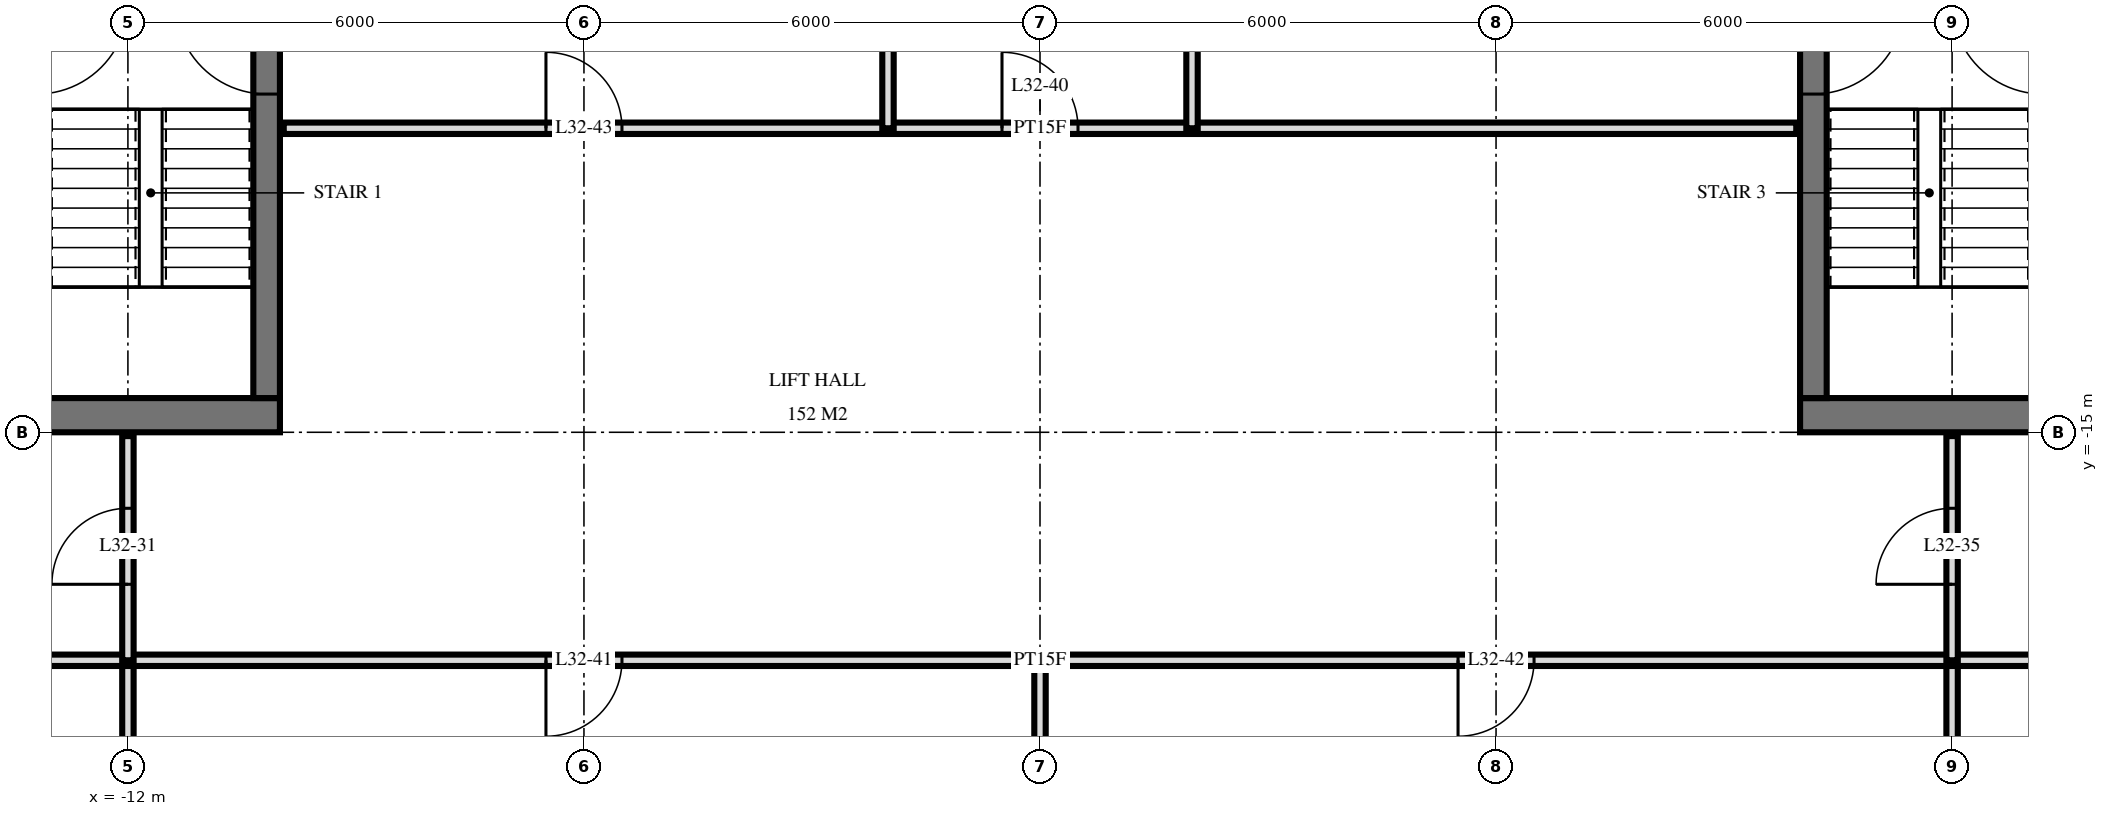
"""IFC4 building model, lengths in metres.
Left out: names, types, materials, properties, quantities, classifications, styles, units other than length and angle.
Written with IfcOpenShell. Run it as: python <this file> out.ifc"""

import sys

from ifc_helpers import new_model, si_unit, direction, frame, frame_2d, origin, place, context, subcontext, project, spatial, rectangle, extrude, element, fill, save


model = new_model("IFC4")
c1 = context("Model", 3, precision=1e-05, world=origin(), true_north=direction((0.0, 1.0)))
c2 = subcontext(c1, "Body", "Model", "MODEL_VIEW")
j1 = project(units=[si_unit("LENGTHUNIT", "METRE"), si_unit("PLANEANGLEUNIT", "RADIAN")], contexts=[c1])
p1 = place(None, origin())
s1 = spatial("IfcSite", under=j1, at=p1, CompositionType="ELEMENT")
p2 = place(p1, origin())
s2 = spatial("IfcBuilding", under=s1, at=p2, CompositionType="ELEMENT")
p3 = place(p2, frame((0.0, 0.0, 127.2)))
s3 = spatial("IfcBuildingStorey", under=s2, at=p3, CompositionType="ELEMENT", Elevation=127.2)
p4 = place(p3, frame((-24.5, -14.775, 0.0), z_axis=(0.0, 0.0, 1.0), x_axis=(1.0, 0.0, 0.0)))
e1 = element("IfcWall", 1, at=p4, inside=s3, PredefinedType="SHEAR", context=c2, shape_type="SweptSolid", body=[
    extrude(rectangle(XDim=14.5, YDim=0.45, at=frame_2d((7.25, 0.0))), origin(), (0.0, 0.0, 1.0), 3.6),
])
p5 = place(p4, frame((6.2, 0.0, 0.0)))
e2 = element("IfcOpeningElement", 2, at=p5, cuts=e1, PredefinedType="OPENING", context=c2, shape_type="SweptSolid", body=[
    extrude(rectangle(XDim=1.2, YDim=2.1, at=frame_2d((0.6, 1.05))), frame((0.0, 0.235, 0.0), z_axis=(0.0, -1.0, 0.0), x_axis=(1.0, 0.0, 0.0)), (0.0, 0.0, 1.0), 0.47),
])
p6 = place(p4, frame((9.25, 0.0, 0.0)))
e3 = element("IfcOpeningElement", 3, at=p6, cuts=e1, PredefinedType="OPENING", context=c2, shape_type="SweptSolid", body=[
    extrude(rectangle(XDim=1.1, YDim=2.1, at=frame_2d((0.55, 1.05))), frame((0.0, 0.235, 0.0), z_axis=(0.0, -1.0, 0.0), x_axis=(1.0, 0.0, 0.0)), (0.0, 0.0, 1.0), 0.47),
])
p7 = place(p4, frame((3.5, 0.0, 0.0)))
e4 = element("IfcOpeningElement", 4, at=p7, cuts=e1, PredefinedType="OPENING", context=c2, shape_type="SweptSolid", body=[
    extrude(rectangle(XDim=0.9, YDim=2.1, at=frame_2d((0.45, 1.05))), frame((0.0, 0.235, 0.0), z_axis=(0.0, -1.0, 0.0), x_axis=(1.0, 0.0, 0.0)), (0.0, 0.0, 1.0), 0.47),
])
p8 = place(p4, frame((1.05, 0.0, 0.0)))
e5 = element("IfcOpeningElement", 5, at=p8, cuts=e1, PredefinedType="OPENING", context=c2, shape_type="SweptSolid", body=[
    extrude(rectangle(XDim=1.0, YDim=2.1, at=frame_2d((0.5, 1.05))), frame((0.0, 0.235, 0.0), z_axis=(0.0, -1.0, 0.0), x_axis=(1.0, 0.0, 0.0)), (0.0, 0.0, 1.0), 0.47),
])
p9 = place(p3, frame((-10.175, -14.55, 0.0), z_axis=(0.0, 0.0, 1.0), x_axis=(0.0, 1.0, 0.0)))
e6 = element("IfcWall", 6, at=p9, inside=s3, PredefinedType="SHEAR", context=c2, shape_type="SweptSolid", body=[
    extrude(rectangle(XDim=14.1, YDim=0.35, at=frame_2d((7.05, 0.0))), origin(), (0.0, 0.0, 1.0), 3.6),
])
p10 = place(p9, frame((8.4, 0.0, 0.0)))
e7 = element("IfcOpeningElement", 7, at=p10, cuts=e6, PredefinedType="OPENING", context=c2, shape_type="SweptSolid", body=[
    extrude(rectangle(XDim=1.4, YDim=2.4, at=frame_2d((0.7, 1.2))), frame((0.0, 0.185, 0.0), z_axis=(0.0, -1.0, 0.0), x_axis=(1.0, 0.0, 0.0)), (0.0, 0.0, 1.0), 0.37),
])
p11 = place(p9, frame((10.0, 0.0, 0.0)))
e8 = element("IfcOpeningElement", 8, at=p11, cuts=e6, PredefinedType="OPENING", context=c2, shape_type="SweptSolid", body=[
    extrude(rectangle(XDim=1.4, YDim=2.4, at=frame_2d((0.7, 1.2))), frame((0.0, 0.185, 0.0), z_axis=(0.0, -1.0, 0.0), x_axis=(1.0, 0.0, 0.0)), (0.0, 0.0, 1.0), 0.37),
])
p12 = place(p9, frame((4.0, 0.0, 0.0)))
e9 = element("IfcOpeningElement", 9, at=p12, cuts=e6, PredefinedType="OPENING", context=c2, shape_type="SweptSolid", body=[
    extrude(rectangle(XDim=1.2, YDim=2.1, at=frame_2d((0.6, 1.05))), frame((0.0, 0.185, 0.0), z_axis=(0.0, -1.0, 0.0), x_axis=(1.0, 0.0, 0.0)), (0.0, 0.0, 1.0), 0.37),
])
p13 = place(p3, frame((10.0, -14.775, 0.0), z_axis=(0.0, 0.0, 1.0), x_axis=(1.0, 0.0, 0.0)))
e10 = element("IfcWall", 10, at=p13, inside=s3, PredefinedType="SHEAR", context=c2, shape_type="SweptSolid", body=[
    extrude(rectangle(XDim=14.5, YDim=0.45, at=frame_2d((7.25, 0.0))), origin(), (0.0, 0.0, 1.0), 3.6),
])
p14 = place(p13, frame((7.1, 0.0, 0.0)))
e11 = element("IfcOpeningElement", 11, at=p14, cuts=e10, PredefinedType="OPENING", context=c2, shape_type="SweptSolid", body=[
    extrude(rectangle(XDim=1.2, YDim=2.1, at=frame_2d((0.6, 1.05))), frame((0.0, 0.235, 0.0), z_axis=(0.0, -1.0, 0.0), x_axis=(1.0, 0.0, 0.0)), (0.0, 0.0, 1.0), 0.47),
])
p15 = place(p13, frame((4.15, 0.0, 0.0)))
e12 = element("IfcOpeningElement", 12, at=p15, cuts=e10, PredefinedType="OPENING", context=c2, shape_type="SweptSolid", body=[
    extrude(rectangle(XDim=1.1, YDim=2.1, at=frame_2d((0.55, 1.05))), frame((0.0, 0.235, 0.0), z_axis=(0.0, -1.0, 0.0), x_axis=(1.0, 0.0, 0.0)), (0.0, 0.0, 1.0), 0.47),
])
p16 = place(p13, frame((10.1, 0.0, 0.0)))
e13 = element("IfcOpeningElement", 13, at=p16, cuts=e10, PredefinedType="OPENING", context=c2, shape_type="SweptSolid", body=[
    extrude(rectangle(XDim=0.9, YDim=2.1, at=frame_2d((0.45, 1.05))), frame((0.0, 0.235, 0.0), z_axis=(0.0, -1.0, 0.0), x_axis=(1.0, 0.0, 0.0)), (0.0, 0.0, 1.0), 0.47),
])
p17 = place(p13, frame((12.45, 0.0, 0.0)))
e14 = element("IfcOpeningElement", 14, at=p17, cuts=e10, PredefinedType="OPENING", context=c2, shape_type="SweptSolid", body=[
    extrude(rectangle(XDim=1.0, YDim=2.1, at=frame_2d((0.5, 1.05))), frame((0.0, 0.235, 0.0), z_axis=(0.0, -1.0, 0.0), x_axis=(1.0, 0.0, 0.0)), (0.0, 0.0, 1.0), 0.47),
])
p18 = place(p3, frame((10.175, -14.55, 0.0), z_axis=(0.0, 0.0, 1.0), x_axis=(0.0, 1.0, 0.0)))
e15 = element("IfcWall", 15, at=p18, inside=s3, PredefinedType="SHEAR", context=c2, shape_type="SweptSolid", body=[
    extrude(rectangle(XDim=14.1, YDim=0.35, at=frame_2d((7.05, 0.0))), origin(), (0.0, 0.0, 1.0), 3.6),
])
p19 = place(p18, frame((8.4, 0.0, 0.0)))
e16 = element("IfcOpeningElement", 16, at=p19, cuts=e15, PredefinedType="OPENING", context=c2, shape_type="SweptSolid", body=[
    extrude(rectangle(XDim=1.4, YDim=2.4, at=frame_2d((0.7, 1.2))), frame((0.0, 0.185, 0.0), z_axis=(0.0, -1.0, 0.0), x_axis=(1.0, 0.0, 0.0)), (0.0, 0.0, 1.0), 0.37),
])
p20 = place(p18, frame((10.0, 0.0, 0.0)))
e17 = element("IfcOpeningElement", 17, at=p20, cuts=e15, PredefinedType="OPENING", context=c2, shape_type="SweptSolid", body=[
    extrude(rectangle(XDim=1.4, YDim=2.4, at=frame_2d((0.7, 1.2))), frame((0.0, 0.185, 0.0), z_axis=(0.0, -1.0, 0.0), x_axis=(1.0, 0.0, 0.0)), (0.0, 0.0, 1.0), 0.37),
])
p21 = place(p18, frame((4.0, 0.0, 0.0)))
e18 = element("IfcOpeningElement", 18, at=p21, cuts=e15, PredefinedType="OPENING", context=c2, shape_type="SweptSolid", body=[
    extrude(rectangle(XDim=1.2, YDim=2.1, at=frame_2d((0.6, 1.05))), frame((0.0, 0.185, 0.0), z_axis=(0.0, -1.0, 0.0), x_axis=(1.0, 0.0, 0.0)), (0.0, 0.0, 1.0), 0.37),
])
p22 = place(p3, frame((12.0, -18.0, 0.0), z_axis=(0.0, 0.0, 1.0), x_axis=(0.0, 1.0, 0.0)))
e19 = element("IfcWall", 19, at=p22, inside=s3, PredefinedType="PARTITIONING", context=c2, shape_type="SweptSolid", body=[
    extrude(rectangle(XDim=2.95, YDim=0.15, at=frame_2d((1.475, 0.0))), origin(), (0.0, 0.0, 1.0), 3.32),
])
p23 = place(p22, frame((1.0, 0.0, 0.0)))
e20 = element("IfcOpeningElement", 20, at=p23, cuts=e19, PredefinedType="OPENING", context=c2, shape_type="SweptSolid", body=[
    extrude(rectangle(XDim=1.0, YDim=2.1, at=frame_2d((0.5, 1.05))), frame((0.0, 0.085, 0.0), z_axis=(0.0, -1.0, 0.0), x_axis=(1.0, 0.0, 0.0)), (0.0, 0.0, 1.0), 0.17),
])
p24 = place(p3, frame((12.0, -33.62, 0.0), z_axis=(0.0, 0.0, 1.0), x_axis=(0.0, 1.0, 0.0)))
e21 = element("IfcWall", 21, at=p24, inside=s3, PredefinedType="PARTITIONING", context=c2, shape_type="SweptSolid", body=[
    extrude(rectangle(XDim=15.62, YDim=0.15, at=frame_2d((7.81, 0.0))), origin(), (0.0, 0.0, 1.0), 3.32),
])
p25 = place(p3, frame((2.0, -11.0, 0.0), z_axis=(0.0, 0.0, 1.0), x_axis=(0.0, 1.0, 0.0)))
e22 = element("IfcWall", 22, at=p25, inside=s3, PredefinedType="PARTITIONING", context=c2, shape_type="SweptSolid", body=[
    extrude(rectangle(XDim=4.0, YDim=0.15, at=frame_2d((2.0, 0.0))), origin(), (0.0, 0.0, 1.0), 3.32),
])
p26 = place(p3, frame((0.0, -33.62, 0.0), z_axis=(0.0, 0.0, 1.0), x_axis=(0.0, 1.0, 0.0)))
e23 = element("IfcWall", 23, at=p26, inside=s3, PredefinedType="PARTITIONING", context=c2, shape_type="SweptSolid", body=[
    extrude(rectangle(XDim=15.62, YDim=0.15, at=frame_2d((7.81, 0.0))), origin(), (0.0, 0.0, 1.0), 3.32),
])
p27 = place(p3, frame((-2.0, -11.0, 0.0), z_axis=(0.0, 0.0, 1.0), x_axis=(0.0, 1.0, 0.0)))
e24 = element("IfcWall", 24, at=p27, inside=s3, PredefinedType="PARTITIONING", context=c2, shape_type="SweptSolid", body=[
    extrude(rectangle(XDim=4.0, YDim=0.15, at=frame_2d((2.0, 0.0))), origin(), (0.0, 0.0, 1.0), 3.32),
])
p28 = place(p3, frame((-12.0, -18.0, 0.0), z_axis=(0.0, 0.0, 1.0), x_axis=(0.0, 1.0, 0.0)))
e25 = element("IfcWall", 25, at=p28, inside=s3, PredefinedType="PARTITIONING", context=c2, shape_type="SweptSolid", body=[
    extrude(rectangle(XDim=2.95, YDim=0.15, at=frame_2d((1.475, 0.0))), origin(), (0.0, 0.0, 1.0), 3.32),
])
p29 = place(p28, frame((1.0, 0.0, 0.0)))
e26 = element("IfcOpeningElement", 26, at=p29, cuts=e25, PredefinedType="OPENING", context=c2, shape_type="SweptSolid", body=[
    extrude(rectangle(XDim=1.0, YDim=2.1, at=frame_2d((0.5, 1.05))), frame((0.0, 0.085, 0.0), z_axis=(0.0, -1.0, 0.0), x_axis=(1.0, 0.0, 0.0)), (0.0, 0.0, 1.0), 0.17),
])
p30 = place(p3, frame((-12.0, -33.62, 0.0), z_axis=(0.0, 0.0, 1.0), x_axis=(0.0, 1.0, 0.0)))
e27 = element("IfcWall", 27, at=p30, inside=s3, PredefinedType="PARTITIONING", context=c2, shape_type="SweptSolid", body=[
    extrude(rectangle(XDim=15.62, YDim=0.15, at=frame_2d((7.81, 0.0))), origin(), (0.0, 0.0, 1.0), 3.32),
])
p31 = place(p3, frame((-28.02, -18.0, 0.0), z_axis=(0.0, 0.0, 1.0), x_axis=(1.0, 0.0, 0.0)))
e28 = element("IfcWall", 28, at=p31, inside=s3, PredefinedType="PARTITIONING", context=c2, shape_type="SweptSolid", body=[
    extrude(rectangle(XDim=56.04, YDim=0.15, at=frame_2d((28.02, 0.0))), origin(), (0.0, 0.0, 1.0), 3.32),
])
p32 = place(p31, frame((13.17, 0.0, 0.0)))
e29 = element("IfcOpeningElement", 29, at=p32, cuts=e28, PredefinedType="OPENING", context=c2, shape_type="SweptSolid", body=[
    extrude(rectangle(XDim=1.0, YDim=2.1, at=frame_2d((0.5, 1.05))), frame((0.0, 0.085, 0.0), z_axis=(0.0, -1.0, 0.0), x_axis=(1.0, 0.0, 0.0)), (0.0, 0.0, 1.0), 0.17),
])
p33 = place(p31, frame((11.32, 0.0, 0.0)))
e30 = element("IfcOpeningElement", 30, at=p33, cuts=e28, PredefinedType="OPENING", context=c2, shape_type="SweptSolid", body=[
    extrude(rectangle(XDim=1.0, YDim=2.1, at=frame_2d((0.5, 1.05))), frame((0.0, 0.085, 0.0), z_axis=(0.0, -1.0, 0.0), x_axis=(1.0, 0.0, 0.0)), (0.0, 0.0, 1.0), 0.17),
])
p34 = place(p31, frame((41.87, 0.0, 0.0)))
e31 = element("IfcOpeningElement", 31, at=p34, cuts=e28, PredefinedType="OPENING", context=c2, shape_type="SweptSolid", body=[
    extrude(rectangle(XDim=1.0, YDim=2.1, at=frame_2d((0.5, 1.05))), frame((0.0, 0.085, 0.0), z_axis=(0.0, -1.0, 0.0), x_axis=(1.0, 0.0, 0.0)), (0.0, 0.0, 1.0), 0.17),
])
p35 = place(p31, frame((43.17, 0.0, 0.0)))
e32 = element("IfcOpeningElement", 32, at=p35, cuts=e28, PredefinedType="OPENING", context=c2, shape_type="SweptSolid", body=[
    extrude(rectangle(XDim=1.0, YDim=2.1, at=frame_2d((0.5, 1.05))), frame((0.0, 0.085, 0.0), z_axis=(0.0, -1.0, 0.0), x_axis=(1.0, 0.0, 0.0)), (0.0, 0.0, 1.0), 0.17),
])
p36 = place(p31, frame((46.72, 0.0, 0.0)))
e33 = element("IfcOpeningElement", 33, at=p36, cuts=e28, PredefinedType="OPENING", context=c2, shape_type="SweptSolid", body=[
    extrude(rectangle(XDim=1.0, YDim=2.1, at=frame_2d((0.5, 1.05))), frame((0.0, 0.085, 0.0), z_axis=(0.0, -1.0, 0.0), x_axis=(1.0, 0.0, 0.0)), (0.0, 0.0, 1.0), 0.17),
])
p37 = place(p31, frame((21.52, 0.0, 0.0)))
e34 = element("IfcOpeningElement", 34, at=p37, cuts=e28, PredefinedType="OPENING", context=c2, shape_type="SweptSolid", body=[
    extrude(rectangle(XDim=1.0, YDim=2.1, at=frame_2d((0.5, 1.05))), frame((0.0, 0.085, 0.0), z_axis=(0.0, -1.0, 0.0), x_axis=(1.0, 0.0, 0.0)), (0.0, 0.0, 1.0), 0.17),
])
p38 = place(p31, frame((33.52, 0.0, 0.0)))
e35 = element("IfcOpeningElement", 35, at=p38, cuts=e28, PredefinedType="OPENING", context=c2, shape_type="SweptSolid", body=[
    extrude(rectangle(XDim=1.0, YDim=2.1, at=frame_2d((0.5, 1.05))), frame((0.0, 0.085, 0.0), z_axis=(0.0, -1.0, 0.0), x_axis=(1.0, 0.0, 0.0)), (0.0, 0.0, 1.0), 0.17),
])
p39 = place(p3, frame((-9.95, -11.0, 0.0), z_axis=(0.0, 0.0, 1.0), x_axis=(1.0, 0.0, 0.0)))
e36 = element("IfcWall", 36, at=p39, inside=s3, PredefinedType="PARTITIONING", context=c2, shape_type="SweptSolid", body=[
    extrude(rectangle(XDim=19.9, YDim=0.15, at=frame_2d((9.95, 0.0))), origin(), (0.0, 0.0, 1.0), 3.32),
])
p40 = place(p39, frame((9.45, 0.0, 0.0)))
e37 = element("IfcOpeningElement", 37, at=p40, cuts=e36, PredefinedType="OPENING", context=c2, shape_type="SweptSolid", body=[
    extrude(rectangle(XDim=1.0, YDim=2.1, at=frame_2d((0.5, 1.05))), frame((0.0, 0.085, 0.0), z_axis=(0.0, -1.0, 0.0), x_axis=(1.0, 0.0, 0.0)), (0.0, 0.0, 1.0), 0.17),
])
p41 = place(p39, frame((3.45, 0.0, 0.0)))
e38 = element("IfcOpeningElement", 38, at=p41, cuts=e36, PredefinedType="OPENING", context=c2, shape_type="SweptSolid", body=[
    extrude(rectangle(XDim=1.0, YDim=2.1, at=frame_2d((0.5, 1.05))), frame((0.0, 0.085, 0.0), z_axis=(0.0, -1.0, 0.0), x_axis=(1.0, 0.0, 0.0)), (0.0, 0.0, 1.0), 0.17),
])
p42 = place(p12, origin())
e39 = element("IfcDoor", 39, at=p42, inside=s3, OperationType="SINGLE_SWING_LEFT", PredefinedType="DOOR", context=c2, shape_type="SweptSolid", body=[
    extrude(rectangle(XDim=1.2, YDim=2.1, at=frame_2d((0.6, 1.05))), frame((0.0, 0.025, 0.0), z_axis=(0.0, -1.0, 0.0), x_axis=(1.0, 0.0, 0.0)), (0.0, 0.0, 1.0), 0.05),
])
fill(e9, e39)
p43 = place(p21, frame((0.6, 0.0, 0.0), z_axis=(0.0, 0.0, 1.0), x_axis=(-1.0, 0.0, 0.0)))
e40 = element("IfcDoor", 40, at=p43, inside=s3, OperationType="SINGLE_SWING_RIGHT", PredefinedType="DOOR", context=c2, shape_type="SweptSolid", body=[
    extrude(rectangle(XDim=1.2, YDim=2.1, at=frame_2d((0.0, 1.05))), frame((0.0, -0.025, 0.0), z_axis=(0.0, 1.0, 0.0), x_axis=(-1.0, 0.0, 0.0)), (0.0, 0.0, 1.0), 0.05),
])
fill(e18, e40)
p44 = place(p29, origin())
e41 = element("IfcDoor", 41, at=p44, inside=s3, OperationType="SINGLE_SWING_RIGHT", PredefinedType="DOOR", context=c2, shape_type="SweptSolid", body=[
    extrude(rectangle(XDim=1.0, YDim=2.1, at=frame_2d((0.5, 1.05))), frame((0.0, 0.025, 0.0), z_axis=(0.0, -1.0, 0.0), x_axis=(1.0, 0.0, 0.0)), (0.0, 0.0, 1.0), 0.05),
])
fill(e26, e41)
p45 = place(p23, origin())
e42 = element("IfcDoor", 42, at=p45, inside=s3, OperationType="SINGLE_SWING_RIGHT", PredefinedType="DOOR", context=c2, shape_type="SweptSolid", body=[
    extrude(rectangle(XDim=1.0, YDim=2.1, at=frame_2d((0.5, 1.05))), frame((0.0, 0.025, 0.0), z_axis=(0.0, -1.0, 0.0), x_axis=(1.0, 0.0, 0.0)), (0.0, 0.0, 1.0), 0.05),
])
fill(e20, e42)
p46 = place(p40, origin())
e43 = element("IfcDoor", 43, at=p46, inside=s3, OperationType="SINGLE_SWING_RIGHT", PredefinedType="DOOR", context=c2, shape_type="SweptSolid", body=[
    extrude(rectangle(XDim=1.0, YDim=2.1, at=frame_2d((0.5, 1.05))), frame((0.0, 0.025, 0.0), z_axis=(0.0, -1.0, 0.0), x_axis=(1.0, 0.0, 0.0)), (0.0, 0.0, 1.0), 0.05),
])
fill(e37, e43)
p47 = place(p37, frame((0.5, 0.0, 0.0), z_axis=(0.0, 0.0, 1.0), x_axis=(-1.0, 0.0, 0.0)))
e44 = element("IfcDoor", 44, at=p47, inside=s3, OperationType="SINGLE_SWING_LEFT", PredefinedType="DOOR", context=c2, shape_type="SweptSolid", body=[
    extrude(rectangle(XDim=1.0, YDim=2.1, at=frame_2d((0.0, 1.05))), frame((0.0, -0.025, 0.0), z_axis=(0.0, 1.0, 0.0), x_axis=(-1.0, 0.0, 0.0)), (0.0, 0.0, 1.0), 0.05),
])
fill(e34, e44)
p48 = place(p38, frame((0.5, 0.0, 0.0), z_axis=(0.0, 0.0, 1.0), x_axis=(-1.0, 0.0, 0.0)))
e45 = element("IfcDoor", 45, at=p48, inside=s3, OperationType="SINGLE_SWING_LEFT", PredefinedType="DOOR", context=c2, shape_type="SweptSolid", body=[
    extrude(rectangle(XDim=1.0, YDim=2.1, at=frame_2d((0.0, 1.05))), frame((0.0, -0.025, 0.0), z_axis=(0.0, 1.0, 0.0), x_axis=(-1.0, 0.0, 0.0)), (0.0, 0.0, 1.0), 0.05),
])
fill(e35, e45)
p49 = place(p41, origin())
e46 = element("IfcDoor", 46, at=p49, inside=s3, OperationType="SINGLE_SWING_RIGHT", PredefinedType="DOOR", context=c2, shape_type="SweptSolid", body=[
    extrude(rectangle(XDim=1.0, YDim=2.1, at=frame_2d((0.5, 1.05))), frame((0.0, 0.025, 0.0), z_axis=(0.0, -1.0, 0.0), x_axis=(1.0, 0.0, 0.0)), (0.0, 0.0, 1.0), 0.05),
])
fill(e38, e46)
save(model, sys.argv[1])
